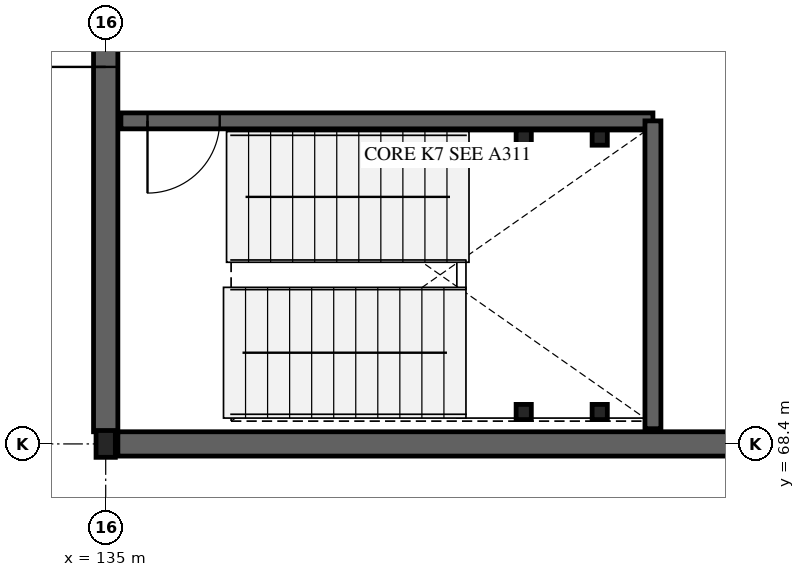
"""IFC4 building model, lengths in metres.
Left out: names, types, materials, properties, quantities, classifications, styles, units other than length and angle.
Written with IfcOpenShell. Run it as: python <this file> out.ifc"""

import sys

from ifc_helpers import new_model, si_unit, direction, frame, frame_2d, origin, origin_2d, place, context, subcontext, project, spatial, rectangle, hollow_rectangle, i_section, extrude, element, fill, save


model = new_model("IFC4")
c1 = context("Model", 3, precision=1e-05, world=origin(), true_north=direction((0.0, 1.0)))
c2 = subcontext(c1, "Body", "Model", "MODEL_VIEW")
j1 = project(units=[si_unit("LENGTHUNIT", "METRE"), si_unit("PLANEANGLEUNIT", "RADIAN")], contexts=[c1])
p1 = place(None, origin())
s1 = spatial("IfcSite", under=j1, at=p1, CompositionType="ELEMENT")
p2 = place(p1, origin())
s2 = spatial("IfcBuilding", under=s1, at=p2, CompositionType="ELEMENT")
p3 = place(p2, frame((0.0, 0.0, 5.04)))
s3 = spatial("IfcBuildingStorey", under=s2, at=p3, CompositionType="ELEMENT", Elevation=5.04)
p4 = place(p3, frame((135.0, 68.4, 0.0), z_axis=(0.0, 0.0, 1.0), x_axis=(1.0, 0.0, 0.0)))
e1 = element("IfcColumn", 1, at=p4, inside=s3, PredefinedType="COLUMN", context=c2, shape_type="SweptSolid", body=[
    extrude(i_section(OverallWidth=0.254, OverallDepth=0.353, WebThickness=0.01, FlangeThickness=0.016, FilletRadius=0.015, at=origin_2d()), origin(), (0.0, 0.0, 1.0), 4.32),
])
p5 = place(p3, frame((135.16, 68.4, 0.0), z_axis=(0.0, 0.0, 1.0), x_axis=(1.0, 0.0, 0.0)))
e2 = element("IfcWall", 2, at=p5, inside=s3, PredefinedType="SHEAR", context=c2, shape_type="SweptSolid", body=[
    extrude(rectangle(XDim=8.68, YDim=0.32, at=frame_2d((4.34, 0.0))), origin(), (0.0, 0.0, 1.0), 4.04),
])
p6 = place(p3, frame((135.0, 68.56, 0.0), z_axis=(0.0, 0.0, 1.0), x_axis=(0.0, 1.0, 0.0)))
e3 = element("IfcWall", 3, at=p6, inside=s3, PredefinedType="SHEAR", context=c2, shape_type="SweptSolid", body=[
    extrude(rectangle(XDim=7.28, YDim=0.32, at=frame_2d((3.64, 0.0))), origin(), (0.0, 0.0, 1.0), 4.04),
])
p7 = place(p6, frame((4.8, 0.0, 0.0)))
e4 = element("IfcOpeningElement", 4, at=p7, cuts=e3, PredefinedType="OPENING", context=c2, shape_type="SweptSolid", body=[
    extrude(rectangle(XDim=1.0, YDim=2.15, at=frame_2d((0.5, 1.075))), frame((0.0, 0.17, 0.0), z_axis=(0.0, -1.0, 0.0), x_axis=(1.0, 0.0, 0.0)), (0.0, 0.0, 1.0), 0.34),
])
p8 = place(p3, frame((135.2, 72.65, 0.0), z_axis=(0.0, 0.0, 1.0), x_axis=(1.0, 0.0, 0.0)))
e5 = element("IfcWall", 5, at=p8, inside=s3, PredefinedType="SOLIDWALL", context=c2, shape_type="SweptSolid", body=[
    extrude(rectangle(XDim=7.0, YDim=0.21, at=frame_2d((3.5, 0.0))), origin(), (0.0, 0.0, 1.0), 4.04),
])
p9 = place(p8, frame((0.35, 0.0, 0.0)))
e6 = element("IfcOpeningElement", 6, at=p9, cuts=e5, PredefinedType="OPENING", context=c2, shape_type="SweptSolid", body=[
    extrude(rectangle(XDim=0.95, YDim=2.12, at=frame_2d((0.475, 1.06))), frame((0.0, 0.115, 0.0), z_axis=(0.0, -1.0, 0.0), x_axis=(1.0, 0.0, 0.0)), (0.0, 0.0, 1.0), 0.23),
])
p10 = place(p3, frame((142.2, 68.6, 0.0), z_axis=(0.0, 0.0, 1.0), x_axis=(0.0, 1.0, 0.0)))
e7 = element("IfcWall", 7, at=p10, inside=s3, PredefinedType="SOLIDWALL", context=c2, shape_type="SweptSolid", body=[
    extrude(rectangle(XDim=4.05, YDim=0.21, at=frame_2d((2.025, 0.0))), origin(), (0.0, 0.0, 1.0), 4.04),
])
for number, where, z_axis, x_axis in (
    (8, (140.5, 68.82, 0.0), (0.0, 0.0, 1.0), (1.0, 0.0, 0.0)),
    (9, (140.5, 72.43, 0.0), (0.0, 0.0, 1.0), (1.0, 0.0, 0.0)),
    (10, (141.5, 68.82, 0.0), (0.0, 0.0, 1.0), (1.0, 0.0, 0.0)),
    (11, (141.5, 72.43, 0.0), (0.0, 0.0, 1.0), (1.0, 0.0, 0.0)),
):
    element("IfcColumn", number, at=place(p3, frame(where, z_axis=z_axis, x_axis=x_axis)), inside=s3, PredefinedType="COLUMN", context=c2, shape_type="SweptSolid", body=[
        extrude(hollow_rectangle(XDim=0.2, YDim=0.2, WallThickness=0.012, at=origin_2d()), origin(), (0.0, 0.0, 1.0), 4.32),
    ])
p11 = place(p9, origin())
e12 = element("IfcDoor", 12, at=p11, inside=s3, OperationType="SINGLE_SWING_RIGHT", PredefinedType="DOOR", context=c2, shape_type="SweptSolid", body=[
    extrude(rectangle(XDim=0.95, YDim=2.12, at=frame_2d((0.475, 1.06))), frame((0.0, 0.025, 0.0), z_axis=(0.0, -1.0, 0.0), x_axis=(1.0, 0.0, 0.0)), (0.0, 0.0, 1.0), 0.05),
])
fill(e6, e12)
p12 = place(p7, origin())
e13 = element("IfcDoor", 13, at=p12, inside=s3, OperationType="SINGLE_SWING_LEFT", PredefinedType="DOOR", context=c2, shape_type="SweptSolid", body=[
    extrude(rectangle(XDim=1.0, YDim=2.15, at=frame_2d((0.5, 1.075))), frame((0.0, 0.025, 0.0), z_axis=(0.0, -1.0, 0.0), x_axis=(1.0, 0.0, 0.0)), (0.0, 0.0, 1.0), 0.05),
])
fill(e4, e13)
save(model, sys.argv[1])
